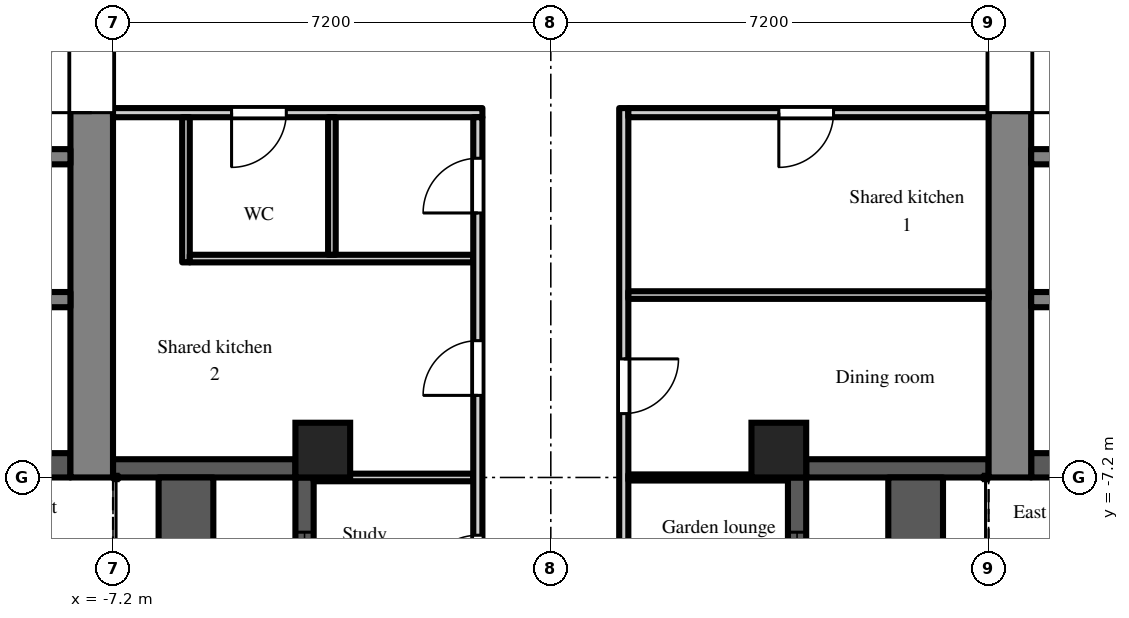
"""IFC4 building model, lengths in metres.
Left out: names, types, materials, properties, quantities, classifications, styles, units other than length and angle.
Written with IfcOpenShell. Run it as: python <this file> out.ifc"""

import sys

from ifc_helpers import new_model, si_unit, direction, frame, frame_2d, origin, origin_2d, place, context, subcontext, project, spatial, rectangle, extrude, element, fill, save


model = new_model("IFC4")
c1 = context("Model", 3, precision=1e-05, world=origin(), true_north=direction((0.0, 1.0)))
c2 = subcontext(c1, "Body", "Model", "MODEL_VIEW")
j1 = project(units=[si_unit("LENGTHUNIT", "METRE"), si_unit("PLANEANGLEUNIT", "RADIAN")], contexts=[c1])
p1 = place(None, origin())
s1 = spatial("IfcSite", under=j1, at=p1, CompositionType="ELEMENT")
p2 = place(p1, origin())
s2 = spatial("IfcBuilding", under=s1, at=p2, CompositionType="ELEMENT")
p3 = place(p2, frame((0.0, 0.0, 170.7)))
s3 = spatial("IfcBuildingStorey", under=s2, at=p3, CompositionType="ELEMENT", Elevation=170.7)
for number, where, z_axis, x_axis in (
    (1, (-3.75, -6.75, 0.0), (0.0, 0.0, 1.0), (1.0, 0.0, 0.0)),
    (2, (3.75, -6.75, 0.0), (0.0, 0.0, 1.0), (1.0, 0.0, 0.0)),
):
    element("IfcColumn", number, at=place(p3, frame(where, z_axis=z_axis, x_axis=x_axis)), inside=s3, PredefinedType="COLUMN", context=c2, shape_type="SweptSolid", body=[
        extrude(rectangle(XDim=0.9, YDim=0.9, at=origin_2d()), origin(), (0.0, 0.0, 1.0), 3.0),
    ])
p4 = place(p3, frame((-7.2, -7.05, 0.0), z_axis=(0.0, 0.0, 1.0), x_axis=(1.0, 0.0, 0.0)))
e3 = element("IfcWall", 3, at=p4, inside=s3, PredefinedType="SOLIDWALL", context=c2, shape_type="SweptSolid", body=[
    extrude(rectangle(XDim=3.0, YDim=0.3, at=frame_2d((1.5, 0.0))), origin(), (0.0, 0.0, 1.0), 2.2),
])
p5 = place(p3, frame((-4.05, -7.2, 0.0), z_axis=(0.0, 0.0, 1.0), x_axis=(0.0, -1.0, 0.0)))
e4 = element("IfcWall", 4, at=p5, inside=s3, PredefinedType="SOLIDWALL", context=c2, shape_type="SweptSolid", body=[
    extrude(rectangle(XDim=7.2, YDim=0.3, at=frame_2d((3.6, 0.0))), origin(), (0.0, 0.0, 1.0), 2.2),
])
p6 = place(p5, frame((3.0, 0.0, 0.0)))
e5 = element("IfcOpeningElement", 5, at=p6, cuts=e4, PredefinedType="OPENING", context=c2, shape_type="SweptSolid", body=[
    extrude(rectangle(XDim=1.2, YDim=2.05, at=frame_2d((0.6, 1.025))), frame((0.0, 0.16, 0.0), z_axis=(0.0, -1.0, 0.0), x_axis=(1.0, 0.0, 0.0)), (0.0, 0.0, 1.0), 0.32),
])
p7 = place(p5, frame((0.9, 0.0, 0.2)))
e6 = element("IfcOpeningElement", 6, at=p7, cuts=e4, PredefinedType="OPENING", context=c2, shape_type="SweptSolid", body=[
    extrude(rectangle(XDim=1.8, YDim=1.85, at=frame_2d((0.9, 0.925))), frame((0.0, 0.16, 0.0), z_axis=(0.0, -1.0, 0.0), x_axis=(1.0, 0.0, 0.0)), (0.0, 0.0, 1.0), 0.32),
])
p8 = place(p5, frame((4.5, 0.0, 0.2)))
e7 = element("IfcOpeningElement", 7, at=p8, cuts=e4, PredefinedType="OPENING", context=c2, shape_type="SweptSolid", body=[
    extrude(rectangle(XDim=1.8, YDim=1.85, at=frame_2d((0.9, 0.925))), frame((0.0, 0.16, 0.0), z_axis=(0.0, -1.0, 0.0), x_axis=(1.0, 0.0, 0.0)), (0.0, 0.0, 1.0), 0.32),
])
p9 = place(p3, frame((4.05, -14.4, 0.0), z_axis=(0.0, 0.0, 1.0), x_axis=(0.0, 1.0, 0.0)))
e8 = element("IfcWall", 8, at=p9, inside=s3, PredefinedType="SOLIDWALL", context=c2, shape_type="SweptSolid", body=[
    extrude(rectangle(XDim=7.2, YDim=0.3, at=frame_2d((3.6, 0.0))), origin(), (0.0, 0.0, 1.0), 2.2),
])
p10 = place(p9, frame((3.0, 0.0, 0.0)))
e9 = element("IfcOpeningElement", 9, at=p10, cuts=e8, PredefinedType="OPENING", context=c2, shape_type="SweptSolid", body=[
    extrude(rectangle(XDim=1.2, YDim=2.05, at=frame_2d((0.6, 1.025))), frame((0.0, 0.16, 0.0), z_axis=(0.0, -1.0, 0.0), x_axis=(1.0, 0.0, 0.0)), (0.0, 0.0, 1.0), 0.32),
])
p11 = place(p9, frame((0.9, 0.0, 0.2)))
e10 = element("IfcOpeningElement", 10, at=p11, cuts=e8, PredefinedType="OPENING", context=c2, shape_type="SweptSolid", body=[
    extrude(rectangle(XDim=1.8, YDim=1.85, at=frame_2d((0.9, 0.925))), frame((0.0, 0.16, 0.0), z_axis=(0.0, -1.0, 0.0), x_axis=(1.0, 0.0, 0.0)), (0.0, 0.0, 1.0), 0.32),
])
p12 = place(p9, frame((4.5, 0.0, 0.2)))
e11 = element("IfcOpeningElement", 11, at=p12, cuts=e8, PredefinedType="OPENING", context=c2, shape_type="SweptSolid", body=[
    extrude(rectangle(XDim=1.8, YDim=1.85, at=frame_2d((0.9, 0.925))), frame((0.0, 0.16, 0.0), z_axis=(0.0, -1.0, 0.0), x_axis=(1.0, 0.0, 0.0)), (0.0, 0.0, 1.0), 0.32),
])
p13 = place(p3, frame((4.2, -7.05, 0.0), z_axis=(0.0, 0.0, 1.0), x_axis=(1.0, 0.0, 0.0)))
e12 = element("IfcWall", 12, at=p13, inside=s3, PredefinedType="SOLIDWALL", context=c2, shape_type="SweptSolid", body=[
    extrude(rectangle(XDim=3.0, YDim=0.3, at=frame_2d((1.5, 0.0))), origin(), (0.0, 0.0, 1.0), 2.2),
])
for number, where, z_axis, x_axis in (
    (13, (6.0, -14.4, 0.0), (0.0, 0.0, 1.0), (0.0, 1.0, 0.0)),
    (14, (-6.0, -14.4, 0.0), (0.0, 0.0, 1.0), (0.0, 1.0, 0.0)),
):
    element("IfcWall", number, at=place(p3, frame(where, z_axis=z_axis, x_axis=x_axis)), inside=s3, PredefinedType="PARAPET", context=c2, shape_type="SweptSolid", body=[
        extrude(rectangle(XDim=7.2, YDim=0.9, at=frame_2d((3.6, 0.0))), origin(), (0.0, 0.0, 1.0), 0.8),
    ])
p14 = place(p3, frame((7.55, -7.2, 0.0), z_axis=(0.0, 0.0, 1.0), x_axis=(0.0, 1.0, 0.0)))
e15 = element("IfcWall", 15, at=p14, inside=s3, PredefinedType="SHEAR", context=c2, shape_type="SweptSolid", body=[
    extrude(rectangle(XDim=14.4, YDim=0.7, at=frame_2d((7.2, 0.0))), origin(), (0.0, 0.0, 1.0), 2.6),
])
p15 = place(p14, frame((6.0, 0.0, 0.0)))
e16 = element("IfcOpeningElement", 16, at=p15, cuts=e15, PredefinedType="OPENING", context=c2, shape_type="SweptSolid", body=[
    extrude(rectangle(XDim=2.4, YDim=2.2, at=frame_2d((1.2, 1.1))), frame((0.0, 0.36, 0.0), z_axis=(0.0, -1.0, 0.0), x_axis=(1.0, 0.0, 0.0)), (0.0, 0.0, 1.0), 0.72),
])
p16 = place(p3, frame((7.9, -7.0, 0.0), z_axis=(0.0, 0.0, 1.0), x_axis=(1.0, 0.0, 0.0)))
e17 = element("IfcWall", 17, at=p16, inside=s3, PredefinedType="SHEAR", context=c2, shape_type="SweptSolid", body=[
    extrude(rectangle(XDim=12.95, YDim=0.4, at=frame_2d((6.475, 0.0))), origin(), (0.0, 0.0, 1.0), 2.6),
])
p17 = place(p3, frame((7.9, -1.925, 0.0), z_axis=(0.0, 0.0, 1.0), x_axis=(1.0, 0.0, 0.0)))
e18 = element("IfcWall", 18, at=p17, inside=s3, PredefinedType="SHEAR", context=c2, shape_type="SweptSolid", body=[
    extrude(rectangle(XDim=12.95, YDim=0.25, at=frame_2d((6.475, 0.0))), origin(), (0.0, 0.0, 1.0), 2.6),
])
p18 = place(p17, frame((0.525, 0.0, 0.0)))
e19 = element("IfcOpeningElement", 19, at=p18, cuts=e18, PredefinedType="OPENING", context=c2, shape_type="SweptSolid", body=[
    extrude(rectangle(XDim=0.9, YDim=2.1, at=frame_2d((0.45, 1.05))), frame((0.0, 0.135, 0.0), z_axis=(0.0, -1.0, 0.0), x_axis=(1.0, 0.0, 0.0)), (0.0, 0.0, 1.0), 0.27),
])
p19 = place(p17, frame((2.625, 0.0, 0.0)))
e20 = element("IfcOpeningElement", 20, at=p19, cuts=e18, PredefinedType="OPENING", context=c2, shape_type="SweptSolid", body=[
    extrude(rectangle(XDim=1.1, YDim=2.1, at=frame_2d((0.55, 1.05))), frame((0.0, 0.135, 0.0), z_axis=(0.0, -1.0, 0.0), x_axis=(1.0, 0.0, 0.0)), (0.0, 0.0, 1.0), 0.27),
])
p20 = place(p17, frame((6.025, 0.0, 0.0)))
e21 = element("IfcOpeningElement", 21, at=p20, cuts=e18, PredefinedType="OPENING", context=c2, shape_type="SweptSolid", body=[
    extrude(rectangle(XDim=0.9, YDim=2.1, at=frame_2d((0.45, 1.05))), frame((0.0, 0.135, 0.0), z_axis=(0.0, -1.0, 0.0), x_axis=(1.0, 0.0, 0.0)), (0.0, 0.0, 1.0), 0.27),
])
p21 = place(p17, frame((10.425, 0.0, 0.0)))
e22 = element("IfcOpeningElement", 22, at=p21, cuts=e18, PredefinedType="OPENING", context=c2, shape_type="SweptSolid", body=[
    extrude(rectangle(XDim=0.9, YDim=2.1, at=frame_2d((0.45, 1.05))), frame((0.0, 0.135, 0.0), z_axis=(0.0, -1.0, 0.0), x_axis=(1.0, 0.0, 0.0)), (0.0, 0.0, 1.0), 0.27),
])
p22 = place(p3, frame((7.9, -4.275, 0.0), z_axis=(0.0, 0.0, 1.0), x_axis=(1.0, 0.0, 0.0)))
e23 = element("IfcWall", 23, at=p22, inside=s3, PredefinedType="SHEAR", context=c2, shape_type="SweptSolid", body=[
    extrude(rectangle(XDim=1.95, YDim=0.25, at=frame_2d((0.975, 0.0))), origin(), (0.0, 0.0, 1.0), 2.6),
])
p23 = place(p3, frame((-7.55, -7.2, 0.0), z_axis=(0.0, 0.0, 1.0), x_axis=(0.0, 1.0, 0.0)))
e24 = element("IfcWall", 24, at=p23, inside=s3, PredefinedType="SHEAR", context=c2, shape_type="SweptSolid", body=[
    extrude(rectangle(XDim=14.4, YDim=0.7, at=frame_2d((7.2, 0.0))), origin(), (0.0, 0.0, 1.0), 2.6),
])
p24 = place(p23, frame((6.0, 0.0, 0.0)))
e25 = element("IfcOpeningElement", 25, at=p24, cuts=e24, PredefinedType="OPENING", context=c2, shape_type="SweptSolid", body=[
    extrude(rectangle(XDim=2.4, YDim=2.2, at=frame_2d((1.2, 1.1))), frame((0.0, 0.36, 0.0), z_axis=(0.0, -1.0, 0.0), x_axis=(1.0, 0.0, 0.0)), (0.0, 0.0, 1.0), 0.72),
])
p25 = place(p3, frame((-7.9, -7.0, 0.0), z_axis=(0.0, 0.0, 1.0), x_axis=(-1.0, 0.0, 0.0)))
e26 = element("IfcWall", 26, at=p25, inside=s3, PredefinedType="SHEAR", context=c2, shape_type="SweptSolid", body=[
    extrude(rectangle(XDim=12.95, YDim=0.4, at=frame_2d((6.475, 0.0))), origin(), (0.0, 0.0, 1.0), 2.6),
])
p26 = place(p3, frame((-7.9, -1.925, 0.0), z_axis=(0.0, 0.0, 1.0), x_axis=(-1.0, 0.0, 0.0)))
e27 = element("IfcWall", 27, at=p26, inside=s3, PredefinedType="SHEAR", context=c2, shape_type="SweptSolid", body=[
    extrude(rectangle(XDim=12.95, YDim=0.25, at=frame_2d((6.475, 0.0))), origin(), (0.0, 0.0, 1.0), 2.6),
])
p27 = place(p26, frame((0.525, 0.0, 0.0)))
e28 = element("IfcOpeningElement", 28, at=p27, cuts=e27, PredefinedType="OPENING", context=c2, shape_type="SweptSolid", body=[
    extrude(rectangle(XDim=0.9, YDim=2.1, at=frame_2d((0.45, 1.05))), frame((0.0, 0.135, 0.0), z_axis=(0.0, -1.0, 0.0), x_axis=(1.0, 0.0, 0.0)), (0.0, 0.0, 1.0), 0.27),
])
p28 = place(p26, frame((2.625, 0.0, 0.0)))
e29 = element("IfcOpeningElement", 29, at=p28, cuts=e27, PredefinedType="OPENING", context=c2, shape_type="SweptSolid", body=[
    extrude(rectangle(XDim=1.1, YDim=2.1, at=frame_2d((0.55, 1.05))), frame((0.0, 0.135, 0.0), z_axis=(0.0, -1.0, 0.0), x_axis=(1.0, 0.0, 0.0)), (0.0, 0.0, 1.0), 0.27),
])
p29 = place(p26, frame((6.025, 0.0, 0.0)))
e30 = element("IfcOpeningElement", 30, at=p29, cuts=e27, PredefinedType="OPENING", context=c2, shape_type="SweptSolid", body=[
    extrude(rectangle(XDim=0.9, YDim=2.1, at=frame_2d((0.45, 1.05))), frame((0.0, 0.135, 0.0), z_axis=(0.0, -1.0, 0.0), x_axis=(1.0, 0.0, 0.0)), (0.0, 0.0, 1.0), 0.27),
])
p30 = place(p26, frame((10.425, 0.0, 0.0)))
e31 = element("IfcOpeningElement", 31, at=p30, cuts=e27, PredefinedType="OPENING", context=c2, shape_type="SweptSolid", body=[
    extrude(rectangle(XDim=0.9, YDim=2.1, at=frame_2d((0.45, 1.05))), frame((0.0, 0.135, 0.0), z_axis=(0.0, -1.0, 0.0), x_axis=(1.0, 0.0, 0.0)), (0.0, 0.0, 1.0), 0.27),
])
p31 = place(p3, frame((-7.9, -4.275, 0.0), z_axis=(0.0, 0.0, 1.0), x_axis=(-1.0, 0.0, 0.0)))
e32 = element("IfcWall", 32, at=p31, inside=s3, PredefinedType="SHEAR", context=c2, shape_type="SweptSolid", body=[
    extrude(rectangle(XDim=1.95, YDim=0.25, at=frame_2d((0.975, 0.0))), origin(), (0.0, 0.0, 1.0), 2.6),
])
p32 = place(p3, frame((-7.2, -1.2, 0.0), z_axis=(0.0, 0.0, 1.0), x_axis=(1.0, 0.0, 0.0)))
e33 = element("IfcWall", 33, at=p32, inside=s3, PredefinedType="PARTITIONING", context=c2, shape_type="SweptSolid", body=[
    extrude(rectangle(XDim=6.075, YDim=0.15, at=frame_2d((3.038, 0.0))), origin(), (0.0, 0.0, 1.0), 2.6),
])
p33 = place(p32, frame((1.95, 0.0, 0.0)))
e34 = element("IfcOpeningElement", 34, at=p33, cuts=e33, PredefinedType="OPENING", context=c2, shape_type="SweptSolid", body=[
    extrude(rectangle(XDim=0.9, YDim=2.1, at=frame_2d((0.45, 1.05))), frame((0.0, 0.085, 0.0), z_axis=(0.0, -1.0, 0.0), x_axis=(1.0, 0.0, 0.0)), (0.0, 0.0, 1.0), 0.17),
])
p34 = place(p3, frame((-6.0, -3.663, 0.0), z_axis=(0.0, 0.0, 1.0), x_axis=(0.0, 1.0, 0.0)))
e35 = element("IfcWall", 35, at=p34, inside=s3, PredefinedType="PARTITIONING", context=c2, shape_type="SweptSolid", body=[
    extrude(rectangle(XDim=2.388, YDim=0.125, at=frame_2d((1.194, 0.0))), origin(), (0.0, 0.0, 1.0), 2.6),
])
p35 = place(p3, frame((-5.938, -3.6, 0.0), z_axis=(0.0, 0.0, 1.0), x_axis=(1.0, 0.0, 0.0)))
e36 = element("IfcWall", 36, at=p35, inside=s3, PredefinedType="PARTITIONING", context=c2, shape_type="SweptSolid", body=[
    extrude(rectangle(XDim=4.663, YDim=0.125, at=frame_2d((2.331, 0.0))), origin(), (0.0, 0.0, 1.0), 2.6),
])
p36 = place(p3, frame((-3.9, -7.2, 0.0), z_axis=(0.0, 0.0, 1.0), x_axis=(1.0, 0.0, 0.0)))
e37 = element("IfcWall", 37, at=p36, inside=s3, PredefinedType="PARTITIONING", context=c2, shape_type="SweptSolid", body=[
    extrude(rectangle(XDim=2.625, YDim=0.125, at=frame_2d((1.312, 0.0))), origin(), (0.0, 0.0, 1.0), 2.6),
])
p37 = place(p3, frame((-3.6, -3.538, 0.0), z_axis=(0.0, 0.0, 1.0), x_axis=(0.0, 1.0, 0.0)))
e38 = element("IfcWall", 38, at=p37, inside=s3, PredefinedType="PARTITIONING", context=c2, shape_type="SweptSolid", body=[
    extrude(rectangle(XDim=2.263, YDim=0.125, at=frame_2d((1.131, 0.0))), origin(), (0.0, 0.0, 1.0), 2.6),
])
p38 = place(p3, frame((-1.2, -17.925, 0.0), z_axis=(0.0, 0.0, 1.0), x_axis=(0.0, 1.0, 0.0)))
e39 = element("IfcWall", 39, at=p38, inside=s3, PredefinedType="PARTITIONING", context=c2, shape_type="SweptSolid", body=[
    extrude(rectangle(XDim=16.65, YDim=0.15, at=frame_2d((8.325, 0.0))), origin(), (0.0, 0.0, 1.0), 2.6),
])
p39 = place(p38, frame((15.075, 0.0, 0.0)))
e40 = element("IfcOpeningElement", 40, at=p39, cuts=e39, PredefinedType="OPENING", context=c2, shape_type="SweptSolid", body=[
    extrude(rectangle(XDim=0.9, YDim=2.1, at=frame_2d((0.45, 1.05))), frame((0.0, 0.085, 0.0), z_axis=(0.0, -1.0, 0.0), x_axis=(1.0, 0.0, 0.0)), (0.0, 0.0, 1.0), 0.17),
])
p40 = place(p38, frame((12.075, 0.0, 0.0)))
e41 = element("IfcOpeningElement", 41, at=p40, cuts=e39, PredefinedType="OPENING", context=c2, shape_type="SweptSolid", body=[
    extrude(rectangle(XDim=0.9, YDim=2.1, at=frame_2d((0.45, 1.05))), frame((0.0, 0.085, 0.0), z_axis=(0.0, -1.0, 0.0), x_axis=(1.0, 0.0, 0.0)), (0.0, 0.0, 1.0), 0.17),
])
p41 = place(p38, frame((8.875, 0.0, 0.0)))
e42 = element("IfcOpeningElement", 42, at=p41, cuts=e39, PredefinedType="OPENING", context=c2, shape_type="SweptSolid", body=[
    extrude(rectangle(XDim=0.9, YDim=2.1, at=frame_2d((0.45, 1.05))), frame((0.0, 0.085, 0.0), z_axis=(0.0, -1.0, 0.0), x_axis=(1.0, 0.0, 0.0)), (0.0, 0.0, 1.0), 0.17),
])
p42 = place(p38, frame((5.275, 0.0, 0.0)))
e43 = element("IfcOpeningElement", 43, at=p42, cuts=e39, PredefinedType="OPENING", context=c2, shape_type="SweptSolid", body=[
    extrude(rectangle(XDim=0.9, YDim=2.1, at=frame_2d((0.45, 1.05))), frame((0.0, 0.085, 0.0), z_axis=(0.0, -1.0, 0.0), x_axis=(1.0, 0.0, 0.0)), (0.0, 0.0, 1.0), 0.17),
])
p43 = place(p38, frame((2.325, 0.0, 0.0)))
e44 = element("IfcOpeningElement", 44, at=p43, cuts=e39, PredefinedType="OPENING", context=c2, shape_type="SweptSolid", body=[
    extrude(rectangle(XDim=1.0, YDim=2.1, at=frame_2d((0.5, 1.05))), frame((0.0, 0.085, 0.0), z_axis=(0.0, -1.0, 0.0), x_axis=(1.0, 0.0, 0.0)), (0.0, 0.0, 1.0), 0.17),
])
p44 = place(p3, frame((1.2, -17.925, 0.0), z_axis=(0.0, 0.0, 1.0), x_axis=(0.0, 1.0, 0.0)))
e45 = element("IfcWall", 45, at=p44, inside=s3, PredefinedType="PARTITIONING", context=c2, shape_type="SweptSolid", body=[
    extrude(rectangle(XDim=16.8, YDim=0.15, at=frame_2d((8.4, 0.0))), origin(), (0.0, 0.0, 1.0), 2.6),
])
p45 = place(p44, frame((11.775, 0.0, 0.0)))
e46 = element("IfcOpeningElement", 46, at=p45, cuts=e45, PredefinedType="OPENING", context=c2, shape_type="SweptSolid", body=[
    extrude(rectangle(XDim=0.9, YDim=2.1, at=frame_2d((0.45, 1.05))), frame((0.0, 0.085, 0.0), z_axis=(0.0, -1.0, 0.0), x_axis=(1.0, 0.0, 0.0)), (0.0, 0.0, 1.0), 0.17),
])
p46 = place(p44, frame((4.475, 0.0, 0.0)))
e47 = element("IfcOpeningElement", 47, at=p46, cuts=e45, PredefinedType="OPENING", context=c2, shape_type="SweptSolid", body=[
    extrude(rectangle(XDim=0.9, YDim=2.1, at=frame_2d((0.45, 1.05))), frame((0.0, 0.085, 0.0), z_axis=(0.0, -1.0, 0.0), x_axis=(1.0, 0.0, 0.0)), (0.0, 0.0, 1.0), 0.17),
])
p47 = place(p44, frame((8.075, 0.0, 0.0)))
e48 = element("IfcOpeningElement", 48, at=p47, cuts=e45, PredefinedType="OPENING", context=c2, shape_type="SweptSolid", body=[
    extrude(rectangle(XDim=0.9, YDim=2.1, at=frame_2d((0.45, 1.05))), frame((0.0, 0.085, 0.0), z_axis=(0.0, -1.0, 0.0), x_axis=(1.0, 0.0, 0.0)), (0.0, 0.0, 1.0), 0.17),
])
p48 = place(p44, frame((0.825, 0.0, 0.0)))
e49 = element("IfcOpeningElement", 49, at=p48, cuts=e45, PredefinedType="OPENING", context=c2, shape_type="SweptSolid", body=[
    extrude(rectangle(XDim=1.8, YDim=2.1, at=frame_2d((0.9, 1.05))), frame((0.0, 0.085, 0.0), z_axis=(0.0, -1.0, 0.0), x_axis=(1.0, 0.0, 0.0)), (0.0, 0.0, 1.0), 0.17),
])
p49 = place(p3, frame((1.275, -7.2, 0.0), z_axis=(0.0, 0.0, 1.0), x_axis=(1.0, 0.0, 0.0)))
e50 = element("IfcWall", 50, at=p49, inside=s3, PredefinedType="PARTITIONING", context=c2, shape_type="SweptSolid", body=[
    extrude(rectangle(XDim=2.625, YDim=0.1, at=frame_2d((1.312, 0.0))), origin(), (0.0, 0.0, 1.0), 2.6),
])
p50 = place(p3, frame((1.275, -4.2, 0.0), z_axis=(0.0, 0.0, 1.0), x_axis=(1.0, 0.0, 0.0)))
e51 = element("IfcWall", 51, at=p50, inside=s3, PredefinedType="PARTITIONING", context=c2, shape_type="SweptSolid", body=[
    extrude(rectangle(XDim=5.925, YDim=0.125, at=frame_2d((2.962, 0.0))), origin(), (0.0, 0.0, 1.0), 2.6),
])
p51 = place(p3, frame((1.275, -1.2, 0.0), z_axis=(0.0, 0.0, 1.0), x_axis=(1.0, 0.0, 0.0)))
e52 = element("IfcWall", 52, at=p51, inside=s3, PredefinedType="PARTITIONING", context=c2, shape_type="SweptSolid", body=[
    extrude(rectangle(XDim=5.925, YDim=0.15, at=frame_2d((2.962, 0.0))), origin(), (0.0, 0.0, 1.0), 2.6),
])
p52 = place(p51, frame((2.475, 0.0, 0.0)))
e53 = element("IfcOpeningElement", 53, at=p52, cuts=e52, PredefinedType="OPENING", context=c2, shape_type="SweptSolid", body=[
    extrude(rectangle(XDim=0.9, YDim=2.1, at=frame_2d((0.45, 1.05))), frame((0.0, 0.085, 0.0), z_axis=(0.0, -1.0, 0.0), x_axis=(1.0, 0.0, 0.0)), (0.0, 0.0, 1.0), 0.17),
])
p53 = place(p7, origin())
e54 = element("IfcWindow", 54, at=p53, inside=s3, PartitioningType="SINGLE_PANEL", PredefinedType="WINDOW", context=c2, shape_type="SweptSolid", body=[
    extrude(rectangle(XDim=1.8, YDim=1.85, at=frame_2d((0.9, 0.925))), frame((0.0, 0.03, 0.0), z_axis=(0.0, -1.0, 0.0), x_axis=(1.0, 0.0, 0.0)), (0.0, 0.0, 1.0), 0.06),
])
fill(e6, e54)
p54 = place(p12, origin())
e55 = element("IfcWindow", 55, at=p54, inside=s3, PartitioningType="SINGLE_PANEL", PredefinedType="WINDOW", context=c2, shape_type="SweptSolid", body=[
    extrude(rectangle(XDim=1.8, YDim=1.85, at=frame_2d((0.9, 0.925))), frame((0.0, 0.03, 0.0), z_axis=(0.0, -1.0, 0.0), x_axis=(1.0, 0.0, 0.0)), (0.0, 0.0, 1.0), 0.06),
])
fill(e11, e55)
p55 = place(p15, frame((2.4, 0.0, 0.0), z_axis=(0.0, 0.0, 1.0), x_axis=(-1.0, 0.0, 0.0)))
e56 = element("IfcDoor", 56, at=p55, inside=s3, OperationType="DOUBLE_DOOR_DOUBLE_SWING", PredefinedType="DOOR", context=c2, shape_type="SweptSolid", body=[
    extrude(rectangle(XDim=2.4, YDim=2.2, at=frame_2d((1.2, 1.1))), frame((0.0, 0.025, 0.0), z_axis=(0.0, -1.0, 0.0), x_axis=(1.0, 0.0, 0.0)), (0.0, 0.0, 1.0), 0.05),
])
fill(e16, e56)
p56 = place(p24, origin())
e57 = element("IfcDoor", 57, at=p56, inside=s3, OperationType="DOUBLE_DOOR_DOUBLE_SWING", PredefinedType="DOOR", context=c2, shape_type="SweptSolid", body=[
    extrude(rectangle(XDim=2.4, YDim=2.2, at=frame_2d((1.2, 1.1))), frame((0.0, 0.025, 0.0), z_axis=(0.0, -1.0, 0.0), x_axis=(1.0, 0.0, 0.0)), (0.0, 0.0, 1.0), 0.05),
])
fill(e25, e57)
p57 = place(p52, frame((0.9, 0.0, 0.0), z_axis=(0.0, 0.0, 1.0), x_axis=(-1.0, 0.0, 0.0)))
e58 = element("IfcDoor", 58, at=p57, inside=s3, OperationType="SINGLE_SWING_RIGHT", PredefinedType="DOOR", context=c2, shape_type="SweptSolid", body=[
    extrude(rectangle(XDim=0.9, YDim=2.1, at=frame_2d((0.45, 1.05))), frame((0.0, 0.025, 0.0), z_axis=(0.0, -1.0, 0.0), x_axis=(1.0, 0.0, 0.0)), (0.0, 0.0, 1.0), 0.05),
])
fill(e53, e58)
p58 = place(p45, frame((0.9, 0.0, 0.0), z_axis=(0.0, 0.0, 1.0), x_axis=(-1.0, 0.0, 0.0)))
e59 = element("IfcDoor", 59, at=p58, inside=s3, OperationType="SINGLE_SWING_LEFT", PredefinedType="DOOR", context=c2, shape_type="SweptSolid", body=[
    extrude(rectangle(XDim=0.9, YDim=2.1, at=frame_2d((0.45, 1.05))), frame((0.0, 0.025, 0.0), z_axis=(0.0, -1.0, 0.0), x_axis=(1.0, 0.0, 0.0)), (0.0, 0.0, 1.0), 0.05),
])
fill(e46, e59)
p59 = place(p39, origin())
e60 = element("IfcDoor", 60, at=p59, inside=s3, OperationType="SINGLE_SWING_LEFT", PredefinedType="DOOR", context=c2, shape_type="SweptSolid", body=[
    extrude(rectangle(XDim=0.9, YDim=2.1, at=frame_2d((0.45, 1.05))), frame((0.0, 0.025, 0.0), z_axis=(0.0, -1.0, 0.0), x_axis=(1.0, 0.0, 0.0)), (0.0, 0.0, 1.0), 0.05),
])
fill(e40, e60)
p60 = place(p33, frame((0.9, 0.0, 0.0), z_axis=(0.0, 0.0, 1.0), x_axis=(-1.0, 0.0, 0.0)))
e61 = element("IfcDoor", 61, at=p60, inside=s3, OperationType="SINGLE_SWING_RIGHT", PredefinedType="DOOR", context=c2, shape_type="SweptSolid", body=[
    extrude(rectangle(XDim=0.9, YDim=2.1, at=frame_2d((0.45, 1.05))), frame((0.0, 0.025, 0.0), z_axis=(0.0, -1.0, 0.0), x_axis=(1.0, 0.0, 0.0)), (0.0, 0.0, 1.0), 0.05),
])
fill(e34, e61)
p61 = place(p40, origin())
e62 = element("IfcDoor", 62, at=p61, inside=s3, OperationType="SINGLE_SWING_LEFT", PredefinedType="DOOR", context=c2, shape_type="SweptSolid", body=[
    extrude(rectangle(XDim=0.9, YDim=2.1, at=frame_2d((0.45, 1.05))), frame((0.0, 0.025, 0.0), z_axis=(0.0, -1.0, 0.0), x_axis=(1.0, 0.0, 0.0)), (0.0, 0.0, 1.0), 0.05),
])
fill(e41, e62)
p62 = place(p41, origin())
e63 = element("IfcDoor", 63, at=p62, inside=s3, OperationType="SINGLE_SWING_LEFT", PredefinedType="DOOR", context=c2, shape_type="SweptSolid", body=[
    extrude(rectangle(XDim=0.9, YDim=2.1, at=frame_2d((0.45, 1.05))), frame((0.0, 0.025, 0.0), z_axis=(0.0, -1.0, 0.0), x_axis=(1.0, 0.0, 0.0)), (0.0, 0.0, 1.0), 0.05),
])
fill(e42, e63)
save(model, sys.argv[1])
